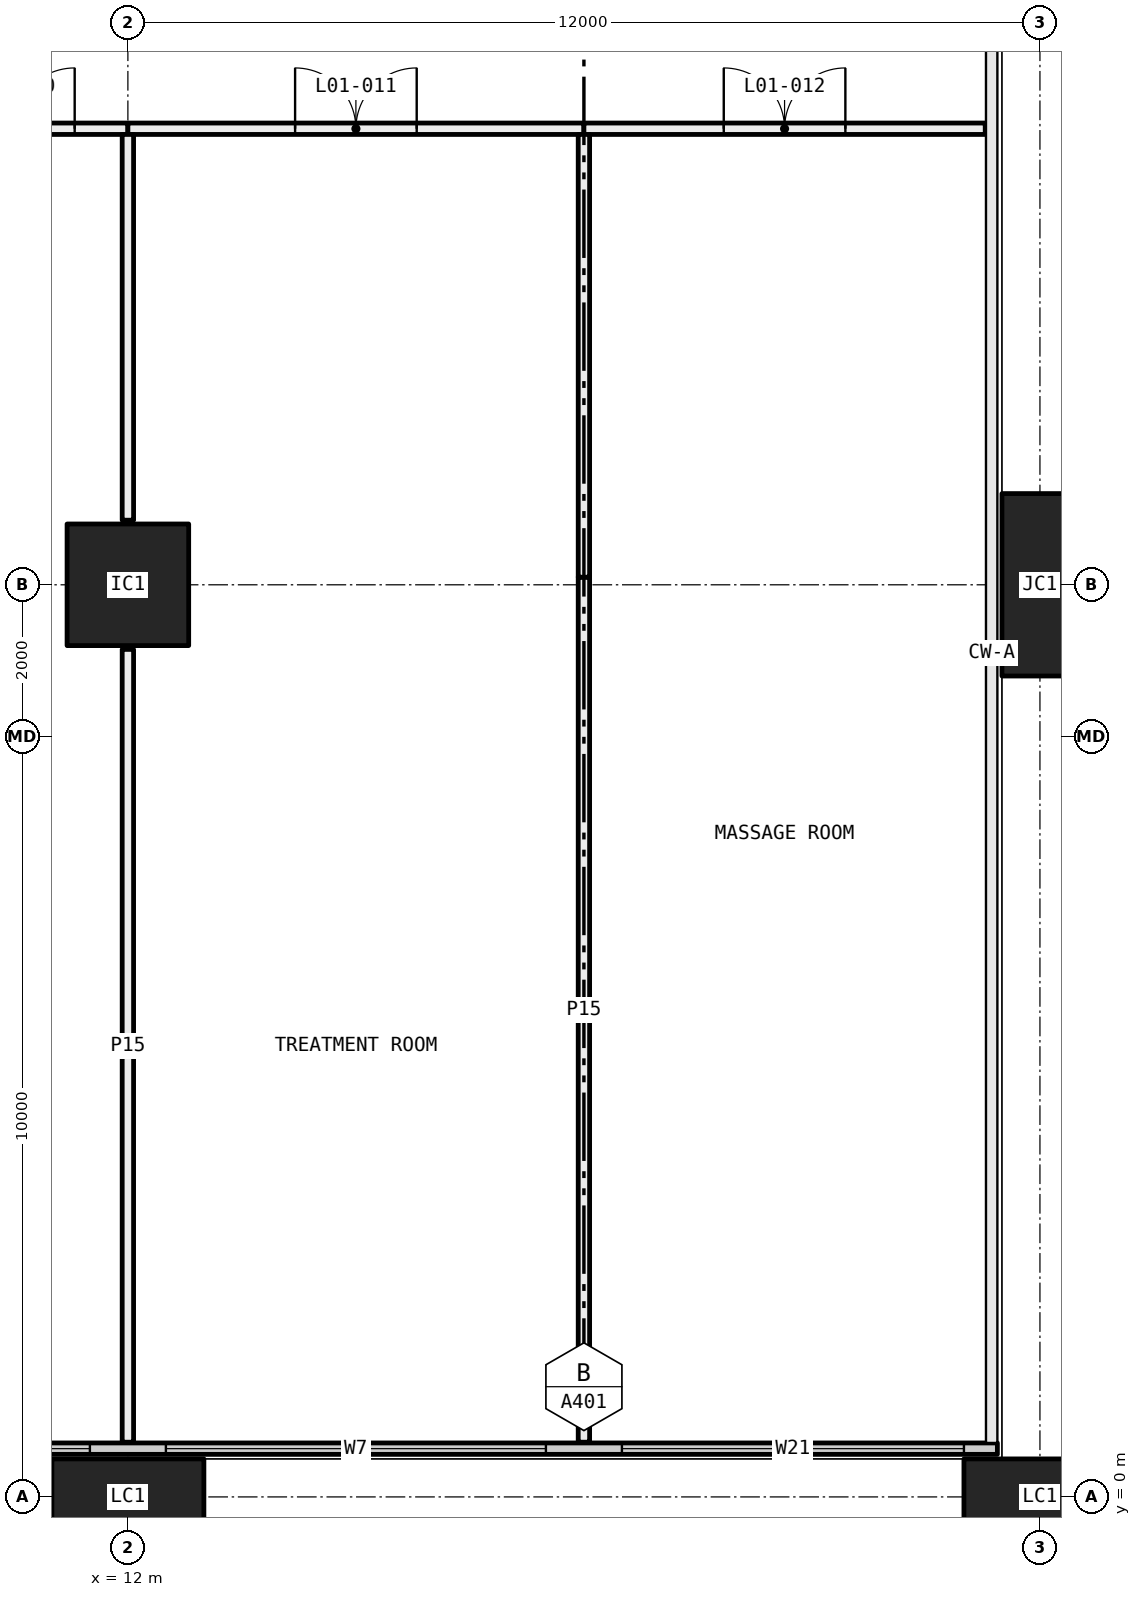
"""IFC4 building model, lengths in metres.
Left out: names, types, materials, properties, quantities, classifications, styles, units other than length and angle.
Written with IfcOpenShell. Run it as: python <this file> out.ifc"""

import sys

from ifc_helpers import new_model, si_unit, direction, frame, frame_2d, origin, origin_2d, place, context, subcontext, project, spatial, rectangle, hollow_rectangle, extrude, element, fill, save


model = new_model("IFC4")
c1 = context("Model", 3, precision=1e-05, world=origin(), true_north=direction((0.0, 1.0)))
c2 = subcontext(c1, "Body", "Model", "MODEL_VIEW")
j1 = project(units=[si_unit("LENGTHUNIT", "METRE"), si_unit("PLANEANGLEUNIT", "RADIAN")], contexts=[c1])
p1 = place(None, origin())
s1 = spatial("IfcSite", under=j1, at=p1, CompositionType="ELEMENT")
p2 = place(p1, origin())
s2 = spatial("IfcBuilding", under=s1, at=p2, CompositionType="ELEMENT")
p3 = place(p2, frame((0.0, 0.0, 6.0)))
s3 = spatial("IfcBuildingStorey", under=s2, at=p3, CompositionType="ELEMENT", Elevation=6.0)
p4 = place(p3, frame((12.0, 0.0, -0.4), z_axis=(0.0, 0.0, 1.0), x_axis=(1.0, 0.0, 0.0)))
e1 = element("IfcColumn", 1, at=p4, inside=s3, PredefinedType="COLUMN", context=c2, shape_type="SweptSolid", body=[
    extrude(hollow_rectangle(XDim=2.0, YDim=1.0, WallThickness=0.08, at=origin_2d()), origin(), (0.0, 0.0, 1.0), 6.0),
])
p5 = place(p3, frame((12.0, 12.0, 0.0), z_axis=(0.0, 0.0, 1.0), x_axis=(1.0, 0.0, 0.0)))
e2 = element("IfcColumn", 2, at=p5, inside=s3, PredefinedType="COLUMN", context=c2, shape_type="SweptSolid", body=[
    extrude(hollow_rectangle(XDim=1.6, YDim=1.6, WallThickness=0.07, at=origin_2d()), origin(), (0.0, 0.0, 1.0), 5.6),
])
p6 = place(p3, frame((24.0, 0.0, -0.4), z_axis=(0.0, 0.0, 1.0), x_axis=(1.0, 0.0, 0.0)))
e3 = element("IfcColumn", 3, at=p6, inside=s3, PredefinedType="COLUMN", context=c2, shape_type="SweptSolid", body=[
    extrude(hollow_rectangle(XDim=2.0, YDim=1.0, WallThickness=0.08, at=origin_2d()), origin(), (0.0, 0.0, 1.0), 6.0),
])
p7 = place(p3, frame((24.0, 12.0, -0.4), z_axis=(0.0, 0.0, 1.0), x_axis=(0.0, 1.0, 0.0)))
e4 = element("IfcColumn", 4, at=p7, inside=s3, PredefinedType="COLUMN", context=c2, shape_type="SweptSolid", body=[
    extrude(hollow_rectangle(XDim=2.4, YDim=1.0, WallThickness=0.09, at=origin_2d()), origin(), (0.0, 0.0, 1.0), 6.0),
])
p8 = place(p3, frame((6.56, 0.635, 0.0), z_axis=(0.0, 0.0, 1.0), x_axis=(1.0, 0.0, 0.0)))
e5 = element("IfcWall", 5, at=p8, inside=s3, PredefinedType="ELEMENTEDWALL", context=c2, shape_type="SweptSolid", body=[
    extrude(rectangle(XDim=16.88, YDim=0.15, at=frame_2d((8.44, 0.0))), origin(), (0.0, 0.0, 1.0), 5.6),
])
p9 = place(p8, frame((0.44, 0.0, 0.45)))
e6 = element("IfcOpeningElement", 6, at=p9, cuts=e5, PredefinedType="OPENING", context=c2, shape_type="SweptSolid", body=[
    extrude(rectangle(XDim=4.5, YDim=5.1, at=frame_2d((2.25, 2.55))), frame((0.0, 0.085, 0.0), z_axis=(0.0, -1.0, 0.0), x_axis=(1.0, 0.0, 0.0)), (0.0, 0.0, 1.0), 0.17),
])
p10 = place(p8, frame((5.94, 0.0, 0.45)))
e7 = element("IfcOpeningElement", 7, at=p10, cuts=e5, PredefinedType="OPENING", context=c2, shape_type="SweptSolid", body=[
    extrude(rectangle(XDim=5.0, YDim=5.1, at=frame_2d((2.5, 2.55))), frame((0.0, 0.085, 0.0), z_axis=(0.0, -1.0, 0.0), x_axis=(1.0, 0.0, 0.0)), (0.0, 0.0, 1.0), 0.17),
])
p11 = place(p8, frame((11.94, 0.0, 0.45)))
e8 = element("IfcOpeningElement", 8, at=p11, cuts=e5, PredefinedType="OPENING", context=c2, shape_type="SweptSolid", body=[
    extrude(rectangle(XDim=4.5, YDim=5.1, at=frame_2d((2.25, 2.55))), frame((0.0, 0.085, 0.0), z_axis=(0.0, -1.0, 0.0), x_axis=(1.0, 0.0, 0.0)), (0.0, 0.0, 1.0), 0.17),
])
p12 = place(p3, frame((9.0, 18.0, 0.0), z_axis=(0.0, 0.0, 1.0), x_axis=(1.0, 0.0, 0.0)))
e9 = element("IfcWall", 9, at=p12, inside=s3, PredefinedType="PARTITIONING", context=c2, shape_type="SweptSolid", body=[
    extrude(rectangle(XDim=3.0, YDim=0.15, at=frame_2d((1.5, 0.0))), origin(), (0.0, 0.0, 1.0), 5.6),
])
p13 = place(p12, frame((0.7, 0.0, 0.0)))
e10 = element("IfcOpeningElement", 10, at=p13, cuts=e9, PredefinedType="OPENING", context=c2, shape_type="SweptSolid", body=[
    extrude(rectangle(XDim=1.6, YDim=2.1, at=frame_2d((0.8, 1.05))), frame((0.0, 0.085, 0.0), z_axis=(0.0, -1.0, 0.0), x_axis=(1.0, 0.0, 0.0)), (0.0, 0.0, 1.0), 0.17),
])
p14 = place(p3, frame((12.0, 18.0, 0.0), z_axis=(0.0, 0.0, 1.0), x_axis=(1.0, 0.0, 0.0)))
e11 = element("IfcWall", 11, at=p14, inside=s3, PredefinedType="PARTITIONING", context=c2, shape_type="SweptSolid", body=[
    extrude(rectangle(XDim=6.0, YDim=0.15, at=frame_2d((3.0, 0.0))), origin(), (0.0, 0.0, 1.0), 5.6),
])
p15 = place(p14, frame((2.2, 0.0, 0.0)))
e12 = element("IfcOpeningElement", 12, at=p15, cuts=e11, PredefinedType="OPENING", context=c2, shape_type="SweptSolid", body=[
    extrude(rectangle(XDim=1.6, YDim=2.1, at=frame_2d((0.8, 1.05))), frame((0.0, 0.085, 0.0), z_axis=(0.0, -1.0, 0.0), x_axis=(1.0, 0.0, 0.0)), (0.0, 0.0, 1.0), 0.17),
])
p16 = place(p3, frame((18.0, 18.0, 0.0), z_axis=(0.0, 0.0, 1.0), x_axis=(1.0, 0.0, 0.0)))
e13 = element("IfcWall", 13, at=p16, inside=s3, PredefinedType="PARTITIONING", context=c2, shape_type="SweptSolid", body=[
    extrude(rectangle(XDim=5.28, YDim=0.15, at=frame_2d((2.64, 0.0))), origin(), (0.0, 0.0, 1.0), 5.6),
])
p17 = place(p16, frame((1.84, 0.0, 0.0)))
e14 = element("IfcOpeningElement", 14, at=p17, cuts=e13, PredefinedType="OPENING", context=c2, shape_type="SweptSolid", body=[
    extrude(rectangle(XDim=1.6, YDim=2.1, at=frame_2d((0.8, 1.05))), frame((0.0, 0.085, 0.0), z_axis=(0.0, -1.0, 0.0), x_axis=(1.0, 0.0, 0.0)), (0.0, 0.0, 1.0), 0.17),
])
p18 = place(p3, frame((12.0, 0.72, 0.0), z_axis=(0.0, 0.0, 1.0), x_axis=(0.0, 1.0, 0.0)))
e15 = element("IfcWall", 15, at=p18, inside=s3, PredefinedType="PARTITIONING", context=c2, shape_type="SweptSolid", body=[
    extrude(rectangle(XDim=10.43, YDim=0.15, at=frame_2d((5.215, 0.0))), origin(), (0.0, 0.0, 1.0), 5.0),
])
p19 = place(p3, frame((12.0, 12.85, 0.0), z_axis=(0.0, 0.0, 1.0), x_axis=(0.0, 1.0, 0.0)))
e16 = element("IfcWall", 16, at=p19, inside=s3, PredefinedType="PARTITIONING", context=c2, shape_type="SweptSolid", body=[
    extrude(rectangle(XDim=5.075, YDim=0.15, at=frame_2d((2.538, 0.0))), origin(), (0.0, 0.0, 1.0), 5.6),
])
p20 = place(p3, frame((18.0, 0.72, 0.0), z_axis=(0.0, 0.0, 1.0), x_axis=(0.0, 1.0, 0.0)))
e17 = element("IfcWall", 17, at=p20, inside=s3, PredefinedType="PARTITIONING", context=c2, shape_type="SweptSolid", body=[
    extrude(rectangle(XDim=11.38, YDim=0.15, at=frame_2d((5.69, 0.0))), origin(), (0.0, 0.0, 1.0), 5.0),
])
p21 = place(p3, frame((18.0, 12.1, 0.0), z_axis=(0.0, 0.0, 1.0), x_axis=(0.0, 1.0, 0.0)))
e18 = element("IfcWall", 18, at=p21, inside=s3, PredefinedType="PARTITIONING", context=c2, shape_type="SweptSolid", body=[
    extrude(rectangle(XDim=5.825, YDim=0.15, at=frame_2d((2.913, 0.0))), origin(), (0.0, 0.0, 1.0), 5.6),
])
p22 = place(p9, origin())
e19 = element("IfcWindow", 19, at=p22, inside=s3, PartitioningType="SINGLE_PANEL", PredefinedType="WINDOW", context=c2, shape_type="SweptSolid", body=[
    extrude(rectangle(XDim=4.5, YDim=5.1, at=frame_2d((2.25, 2.55))), frame((0.0, 0.03, 0.0), z_axis=(0.0, -1.0, 0.0), x_axis=(1.0, 0.0, 0.0)), (0.0, 0.0, 1.0), 0.06),
])
fill(e6, e19)
p23 = place(p10, origin())
e20 = element("IfcWindow", 20, at=p23, inside=s3, PartitioningType="SINGLE_PANEL", PredefinedType="WINDOW", context=c2, shape_type="SweptSolid", body=[
    extrude(rectangle(XDim=5.0, YDim=5.1, at=frame_2d((2.5, 2.55))), frame((0.0, 0.03, 0.0), z_axis=(0.0, -1.0, 0.0), x_axis=(1.0, 0.0, 0.0)), (0.0, 0.0, 1.0), 0.06),
])
fill(e7, e20)
p24 = place(p11, origin())
e21 = element("IfcWindow", 21, at=p24, inside=s3, PartitioningType="SINGLE_PANEL", PredefinedType="WINDOW", context=c2, shape_type="SweptSolid", body=[
    extrude(rectangle(XDim=4.5, YDim=5.1, at=frame_2d((2.25, 2.55))), frame((0.0, 0.03, 0.0), z_axis=(0.0, -1.0, 0.0), x_axis=(1.0, 0.0, 0.0)), (0.0, 0.0, 1.0), 0.06),
])
fill(e8, e21)
p25 = place(p13, origin())
e22 = element("IfcDoor", 22, at=p25, inside=s3, OperationType="DOUBLE_DOOR_SINGLE_SWING", PredefinedType="DOOR", context=c2, shape_type="SweptSolid", body=[
    extrude(rectangle(XDim=1.6, YDim=2.1, at=frame_2d((0.8, 1.05))), frame((0.0, 0.025, 0.0), z_axis=(0.0, -1.0, 0.0), x_axis=(1.0, 0.0, 0.0)), (0.0, 0.0, 1.0), 0.05),
])
fill(e10, e22)
p26 = place(p15, origin())
e23 = element("IfcDoor", 23, at=p26, inside=s3, OperationType="DOUBLE_DOOR_SINGLE_SWING", PredefinedType="DOOR", context=c2, shape_type="SweptSolid", body=[
    extrude(rectangle(XDim=1.6, YDim=2.1, at=frame_2d((0.8, 1.05))), frame((0.0, 0.025, 0.0), z_axis=(0.0, -1.0, 0.0), x_axis=(1.0, 0.0, 0.0)), (0.0, 0.0, 1.0), 0.05),
])
fill(e12, e23)
p27 = place(p17, origin())
e24 = element("IfcDoor", 24, at=p27, inside=s3, OperationType="DOUBLE_DOOR_SINGLE_SWING", PredefinedType="DOOR", context=c2, shape_type="SweptSolid", body=[
    extrude(rectangle(XDim=1.6, YDim=2.1, at=frame_2d((0.8, 1.05))), frame((0.0, 0.025, 0.0), z_axis=(0.0, -1.0, 0.0), x_axis=(1.0, 0.0, 0.0)), (0.0, 0.0, 1.0), 0.05),
])
fill(e14, e24)
save(model, sys.argv[1])
